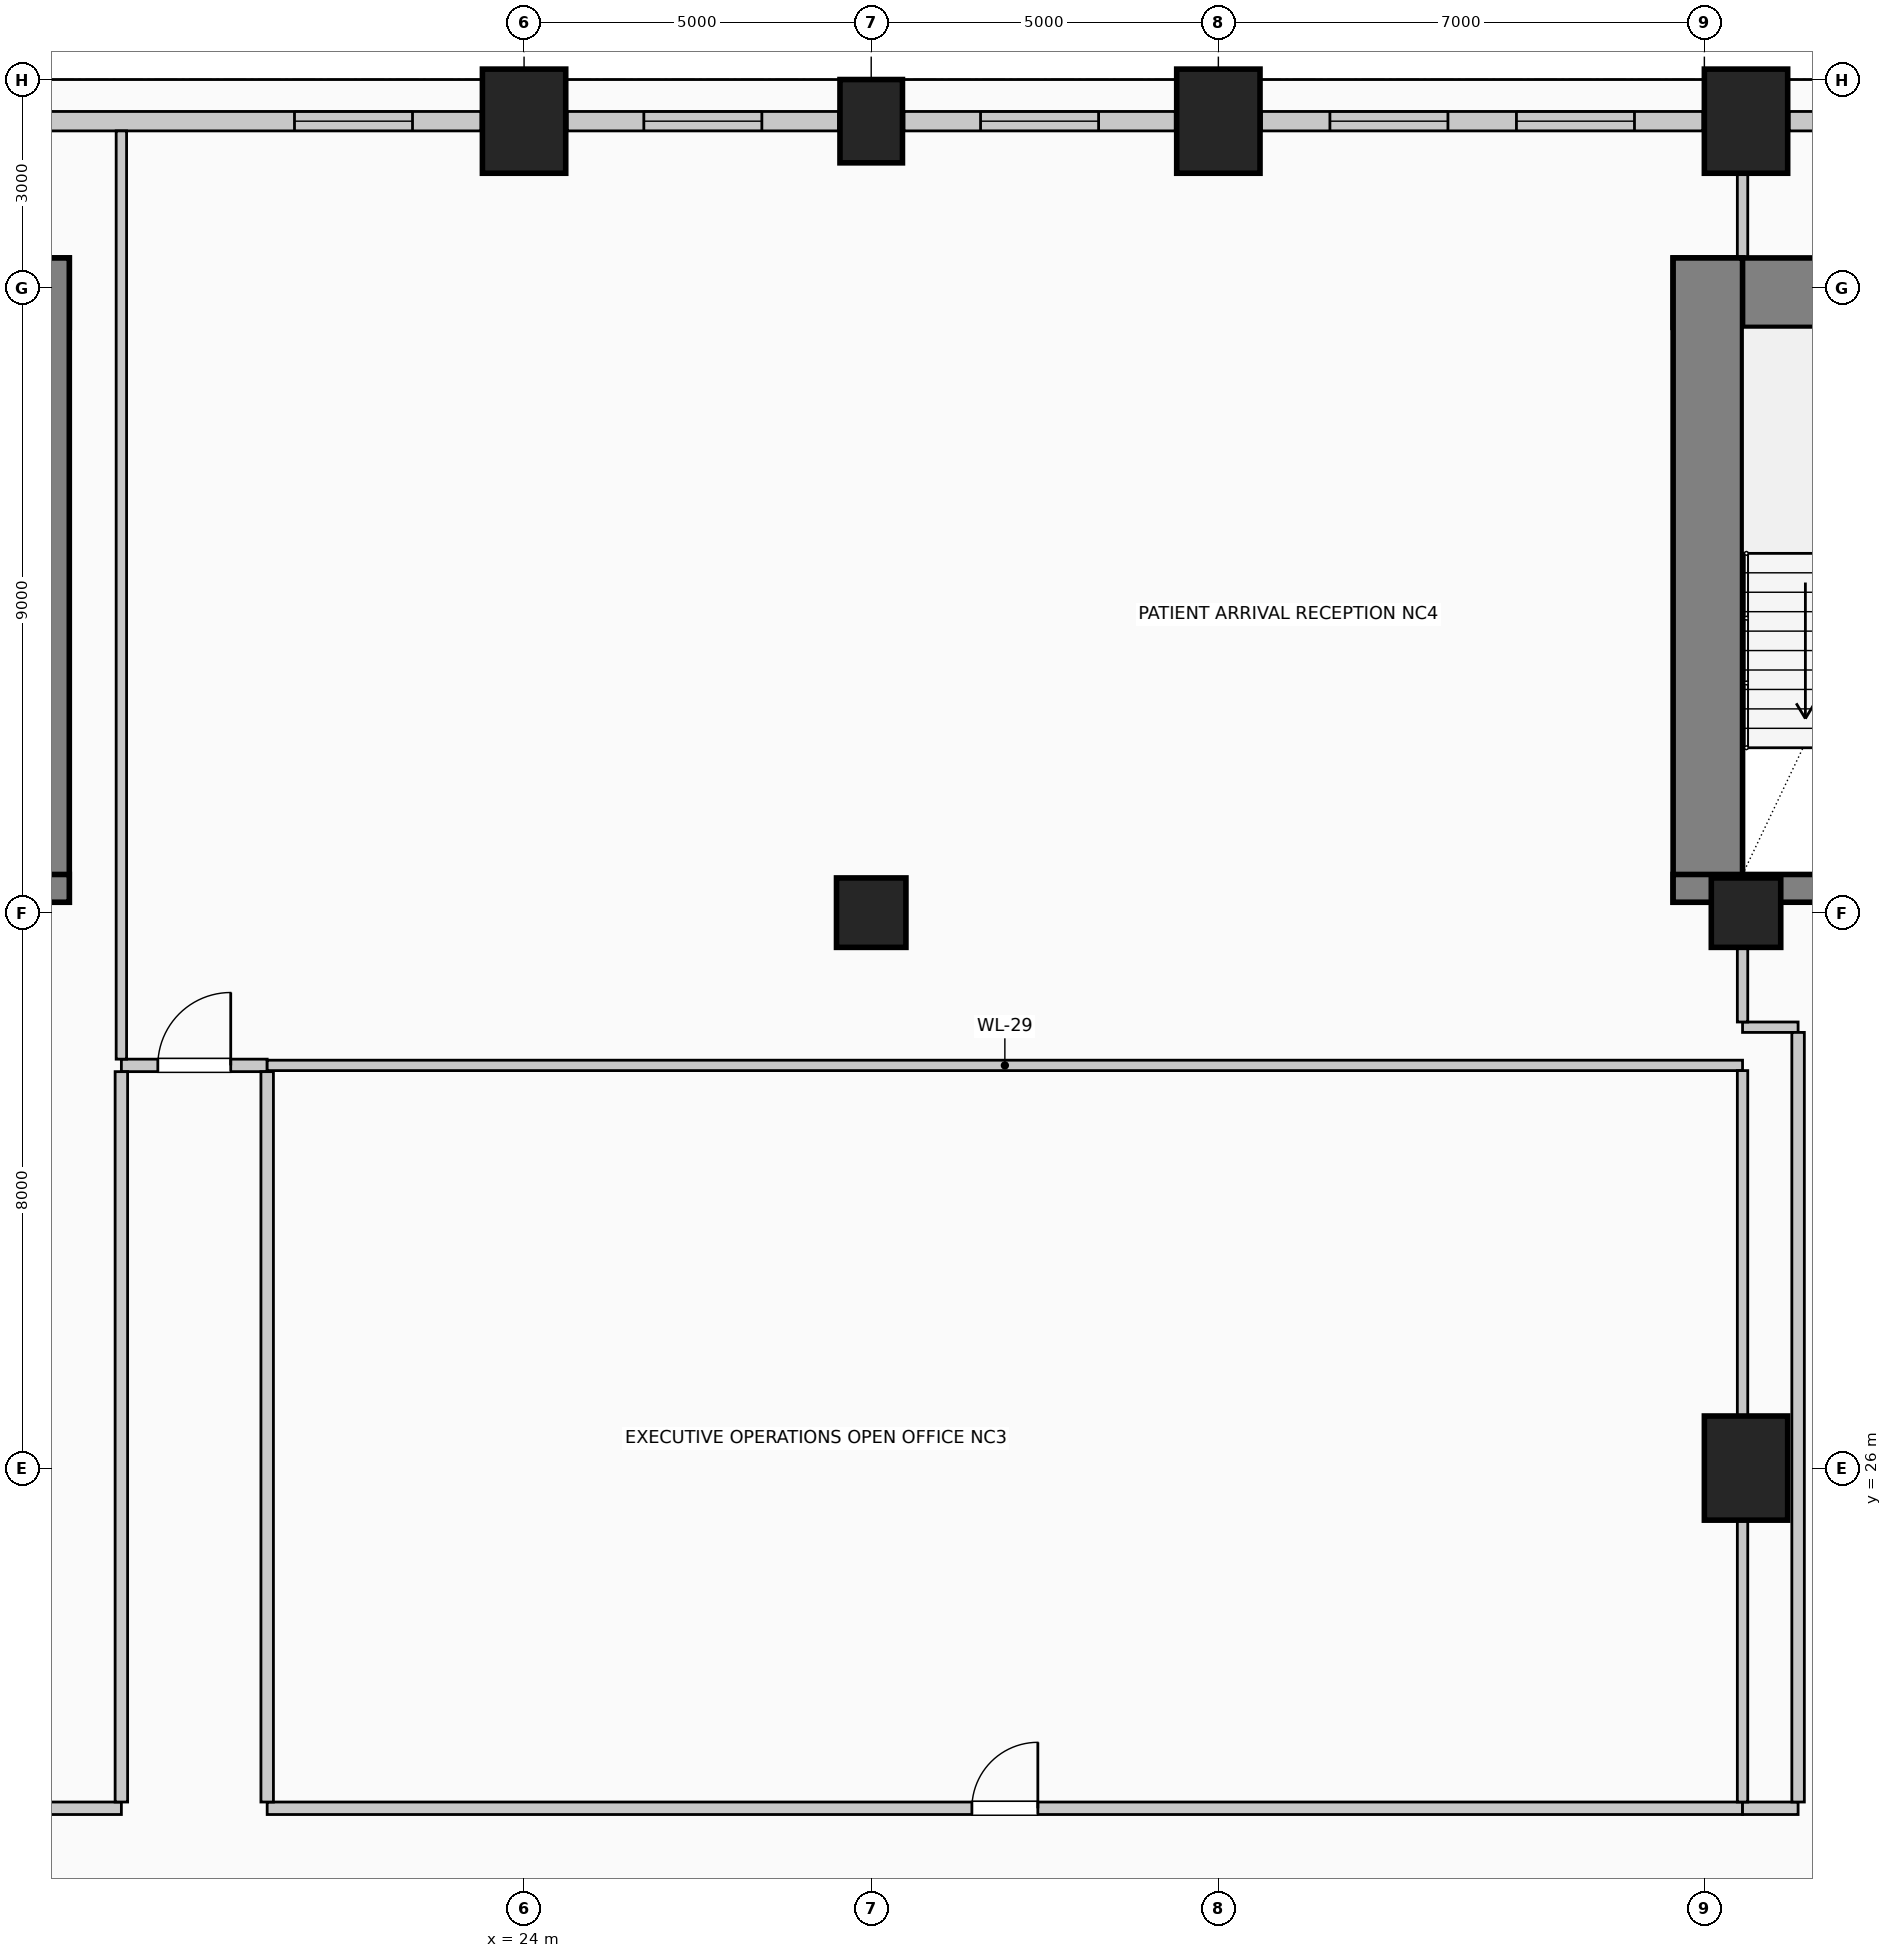
"""IFC4 building model, lengths in metres.
Left out: names, types, materials, properties, quantities, classifications, styles, units other than length and angle.
Written with IfcOpenShell. Run it as: python <this file> out.ifc"""

import sys

from ifc_helpers import new_model, si_unit, direction, frame, frame_2d, origin, origin_2d, place, context, subcontext, project, spatial, rectangle, circle, extrude, element, fill, save


model = new_model("IFC4")
c1 = context("Model", 3, precision=1e-05, world=origin(), true_north=direction((0.0, 1.0)))
c2 = subcontext(c1, "Body", "Model", "MODEL_VIEW")
j1 = project(units=[si_unit("LENGTHUNIT", "METRE"), si_unit("PLANEANGLEUNIT", "RADIAN")], contexts=[c1])
p1 = place(None, origin())
s1 = spatial("IfcSite", under=j1, at=p1, CompositionType="ELEMENT")
p2 = place(p1, origin())
s2 = spatial("IfcBuilding", under=s1, at=p2, CompositionType="ELEMENT")
p3 = place(p2, frame((0.0, 0.0, 54.6)))
s3 = spatial("IfcBuildingStorey", under=s2, at=p3, CompositionType="ELEMENT", Elevation=54.6)
p4 = place(p3, frame((2.55, 42.93, 0.0), z_axis=(0.0, 0.0, 1.0), x_axis=(1.0, 0.0, 0.0)))
e1 = element("IfcWall", 1, at=p4, inside=s3, PredefinedType="SHEAR", context=c2, shape_type="SweptSolid", body=[
    extrude(rectangle(XDim=14.9, YDim=1.0, at=frame_2d((7.45, 0.0))), origin(), (0.0, 0.0, 1.0), 4.0),
])
p5 = place(p3, frame((16.95, 34.15, 0.0), z_axis=(0.0, 0.0, 1.0), x_axis=(0.0, 1.0, 0.0)))
e2 = element("IfcWall", 2, at=p5, inside=s3, PredefinedType="SHEAR", context=c2, shape_type="SweptSolid", body=[
    extrude(rectangle(XDim=9.28, YDim=1.0, at=frame_2d((4.64, 0.0))), origin(), (0.0, 0.0, 1.0), 4.0),
])
p6 = place(p3, frame((12.29, 34.35, 0.0), z_axis=(0.0, 0.0, 1.0), x_axis=(1.0, 0.0, 0.0)))
e3 = element("IfcWall", 3, at=p6, inside=s3, PredefinedType="SHEAR", context=c2, shape_type="SweptSolid", body=[
    extrude(rectangle(XDim=5.16, YDim=0.4, at=frame_2d((2.58, 0.0))), origin(), (0.0, 0.0, 1.0), 4.0),
])
p7 = place(p6, frame((1.4, 0.0, 0.0)))
e4 = element("IfcOpeningElement", 4, at=p7, cuts=e3, PredefinedType="OPENING", context=c2, shape_type="SweptSolid", body=[
    extrude(rectangle(XDim=1.15, YDim=2.2, at=frame_2d((0.575, 1.1))), frame((0.0, 0.21, 0.0), z_axis=(0.0, -1.0, 0.0), x_axis=(1.0, 0.0, 0.0)), (0.0, 0.0, 1.0), 0.42),
])
p8 = place(p3, frame((40.55, 42.93, 0.0), z_axis=(0.0, 0.0, 1.0), x_axis=(1.0, 0.0, 0.0)))
e5 = element("IfcWall", 5, at=p8, inside=s3, PredefinedType="SHEAR", context=c2, shape_type="SweptSolid", body=[
    extrude(rectangle(XDim=14.9, YDim=1.0, at=frame_2d((7.45, 0.0))), origin(), (0.0, 0.0, 1.0), 4.0),
])
p9 = place(p3, frame((41.05, 34.15, 0.0), z_axis=(0.0, 0.0, 1.0), x_axis=(0.0, 1.0, 0.0)))
e6 = element("IfcWall", 6, at=p9, inside=s3, PredefinedType="SHEAR", context=c2, shape_type="SweptSolid", body=[
    extrude(rectangle(XDim=9.28, YDim=1.0, at=frame_2d((4.64, 0.0))), origin(), (0.0, 0.0, 1.0), 4.0),
])
p10 = place(p3, frame((40.55, 34.35, 0.0), z_axis=(0.0, 0.0, 1.0), x_axis=(1.0, 0.0, 0.0)))
e7 = element("IfcWall", 7, at=p10, inside=s3, PredefinedType="SHEAR", context=c2, shape_type="SweptSolid", body=[
    extrude(rectangle(XDim=5.16, YDim=0.4, at=frame_2d((2.58, 0.0))), origin(), (0.0, 0.0, 1.0), 4.0),
])
p11 = place(p10, frame((2.4, 0.0, 0.0)))
e8 = element("IfcOpeningElement", 8, at=p11, cuts=e7, PredefinedType="OPENING", context=c2, shape_type="SweptSolid", body=[
    extrude(rectangle(XDim=1.15, YDim=2.2, at=frame_2d((0.575, 1.1))), frame((0.0, 0.21, 0.0), z_axis=(0.0, -1.0, 0.0), x_axis=(1.0, 0.0, 0.0)), (0.0, 0.0, 1.0), 0.42),
])
p12 = place(p3, frame((24.0, 45.4, 0.0), z_axis=(0.0, 0.0, 1.0), x_axis=(1.0, 0.0, 0.0)))
e9 = element("IfcColumn", 9, at=p12, inside=s3, PredefinedType="COLUMN", context=c2, shape_type="SweptSolid", body=[
    extrude(rectangle(XDim=1.2, YDim=1.5, at=origin_2d()), origin(), (0.0, 0.0, 1.0), 4.0),
])
p13 = place(p3, frame((29.0, 45.4, 0.0), z_axis=(0.0, 0.0, 1.0), x_axis=(1.0, 0.0, 0.0)))
e10 = element("IfcColumn", 10, at=p13, inside=s3, PredefinedType="COLUMN", context=c2, shape_type="SweptSolid", body=[
    extrude(rectangle(XDim=0.9, YDim=1.2, at=origin_2d()), origin(), (0.0, 0.0, 1.0), 4.0),
])
for number, where, z_axis, x_axis in (
    (11, (34.0, 45.4, 0.0), (0.0, 0.0, 1.0), (1.0, 0.0, 0.0)),
    (12, (41.6, 45.4, 0.0), (0.0, 0.0, 1.0), (1.0, 0.0, 0.0)),
    (13, (41.6, 26.0, 0.0), (0.0, 0.0, 1.0), (1.0, 0.0, 0.0)),
):
    element("IfcColumn", number, at=place(p3, frame(where, z_axis=z_axis, x_axis=x_axis)), inside=s3, PredefinedType="COLUMN", context=c2, shape_type="SweptSolid", body=[
        extrude(rectangle(XDim=1.2, YDim=1.5, at=origin_2d()), origin(), (0.0, 0.0, 1.0), 4.0),
    ])
for number, where, z_axis, x_axis in (
    (14, (29.0, 34.0, 0.0), (0.0, 0.0, 1.0), (1.0, 0.0, 0.0)),
    (15, (41.6, 34.0, 0.0), (0.0, 0.0, 1.0), (1.0, 0.0, 0.0)),
):
    element("IfcColumn", number, at=place(p3, frame(where, z_axis=z_axis, x_axis=x_axis)), inside=s3, PredefinedType="COLUMN", context=c2, shape_type="SweptSolid", body=[
        extrude(circle(Radius=0.5, at=origin_2d()), origin(), (0.0, 0.0, 1.0), 4.0),
    ])
p14 = place(p3, frame((17.02, 45.4, 0.0), z_axis=(0.0, 0.0, 1.0), x_axis=(1.0, 0.0, 0.0)))
e16 = element("IfcWall", 16, at=p14, inside=s3, PredefinedType="SOLIDWALL", context=c2, shape_type="SweptSolid", body=[
    extrude(rectangle(XDim=6.36, YDim=0.28, at=frame_2d((3.18, 0.0))), origin(), (0.0, 0.0, 1.0), 2.85),
])
p15 = place(p14, frame((3.673, 0.0, 0.5)))
e17 = element("IfcOpeningElement", 17, at=p15, cuts=e16, PredefinedType="OPENING", context=c2, shape_type="SweptSolid", body=[
    extrude(rectangle(XDim=1.7, YDim=1.95, at=frame_2d((0.85, 0.975))), frame((0.0, 0.15, 0.0), z_axis=(0.0, -1.0, 0.0), x_axis=(1.0, 0.0, 0.0)), (0.0, 0.0, 1.0), 0.3),
])
p16 = place(p3, frame((24.62, 45.4, 0.0), z_axis=(0.0, 0.0, 1.0), x_axis=(1.0, 0.0, 0.0)))
e18 = element("IfcWall", 18, at=p16, inside=s3, PredefinedType="SOLIDWALL", context=c2, shape_type="SweptSolid", body=[
    extrude(rectangle(XDim=3.91, YDim=0.28, at=frame_2d((1.955, 0.0))), origin(), (0.0, 0.0, 1.0), 2.85),
])
p17 = place(p16, frame((1.105, 0.0, 0.5)))
e19 = element("IfcOpeningElement", 19, at=p17, cuts=e18, PredefinedType="OPENING", context=c2, shape_type="SweptSolid", body=[
    extrude(rectangle(XDim=1.7, YDim=1.95, at=frame_2d((0.85, 0.975))), frame((0.0, 0.15, 0.0), z_axis=(0.0, -1.0, 0.0), x_axis=(1.0, 0.0, 0.0)), (0.0, 0.0, 1.0), 0.3),
])
p18 = place(p3, frame((29.47, 45.4, 0.0), z_axis=(0.0, 0.0, 1.0), x_axis=(1.0, 0.0, 0.0)))
e20 = element("IfcWall", 20, at=p18, inside=s3, PredefinedType="SOLIDWALL", context=c2, shape_type="SweptSolid", body=[
    extrude(rectangle(XDim=3.91, YDim=0.28, at=frame_2d((1.955, 0.0))), origin(), (0.0, 0.0, 1.0), 2.85),
])
p19 = place(p18, frame((1.105, 0.0, 0.5)))
e21 = element("IfcOpeningElement", 21, at=p19, cuts=e20, PredefinedType="OPENING", context=c2, shape_type="SweptSolid", body=[
    extrude(rectangle(XDim=1.7, YDim=1.95, at=frame_2d((0.85, 0.975))), frame((0.0, 0.15, 0.0), z_axis=(0.0, -1.0, 0.0), x_axis=(1.0, 0.0, 0.0)), (0.0, 0.0, 1.0), 0.3),
])
p20 = place(p3, frame((34.62, 45.4, 0.0), z_axis=(0.0, 0.0, 1.0), x_axis=(1.0, 0.0, 0.0)))
e22 = element("IfcWall", 22, at=p20, inside=s3, PredefinedType="SOLIDWALL", context=c2, shape_type="SweptSolid", body=[
    extrude(rectangle(XDim=6.36, YDim=0.28, at=frame_2d((3.18, 0.0))), origin(), (0.0, 0.0, 1.0), 2.85),
])
p21 = place(p20, frame((0.987, 0.0, 0.5)))
e23 = element("IfcOpeningElement", 23, at=p21, cuts=e22, PredefinedType="OPENING", context=c2, shape_type="SweptSolid", body=[
    extrude(rectangle(XDim=1.7, YDim=1.95, at=frame_2d((0.85, 0.975))), frame((0.0, 0.15, 0.0), z_axis=(0.0, -1.0, 0.0), x_axis=(1.0, 0.0, 0.0)), (0.0, 0.0, 1.0), 0.3),
])
p22 = place(p20, frame((3.673, 0.0, 0.5)))
e24 = element("IfcOpeningElement", 24, at=p22, cuts=e22, PredefinedType="OPENING", context=c2, shape_type="SweptSolid", body=[
    extrude(rectangle(XDim=1.7, YDim=1.95, at=frame_2d((0.85, 0.975))), frame((0.0, 0.15, 0.0), z_axis=(0.0, -1.0, 0.0), x_axis=(1.0, 0.0, 0.0)), (0.0, 0.0, 1.0), 0.3),
])
p23 = place(p3, frame((42.22, 45.4, 0.0), z_axis=(0.0, 0.0, 1.0), x_axis=(1.0, 0.0, 0.0)))
e25 = element("IfcWall", 25, at=p23, inside=s3, PredefinedType="SOLIDWALL", context=c2, shape_type="SweptSolid", body=[
    extrude(rectangle(XDim=1.31, YDim=0.28, at=frame_2d((0.655, 0.0))), origin(), (0.0, 0.0, 1.0), 2.85),
])
p24 = place(p3, frame((12.2, 21.1, 0.0), z_axis=(0.0, 0.0, 1.0), x_axis=(1.0, 0.0, 0.0)))
e26 = element("IfcWall", 26, at=p24, inside=s3, PredefinedType="PARTITIONING", context=c2, shape_type="SweptSolid", body=[
    extrude(rectangle(XDim=6.0, YDim=0.18, at=frame_2d((3.0, 0.0))), origin(), (0.0, 0.0, 1.0), 3.7),
])
p25 = place(p3, frame((20.3, 21.1, 0.0), z_axis=(0.0, 0.0, 1.0), x_axis=(1.0, 0.0, 0.0)))
e27 = element("IfcWall", 27, at=p25, inside=s3, PredefinedType="PARTITIONING", context=c2, shape_type="SweptSolid", body=[
    extrude(rectangle(XDim=21.25, YDim=0.18, at=frame_2d((10.625, 0.0))), origin(), (0.0, 0.0, 1.0), 3.7),
])
p26 = place(p25, frame((10.15, 0.0, 0.0)))
e28 = element("IfcOpeningElement", 28, at=p26, cuts=e27, PredefinedType="OPENING", context=c2, shape_type="SweptSolid", body=[
    extrude(rectangle(XDim=0.95, YDim=2.15, at=frame_2d((0.475, 1.075))), frame((0.0, 0.1, 0.0), z_axis=(0.0, -1.0, 0.0), x_axis=(1.0, 0.0, 0.0)), (0.0, 0.0, 1.0), 0.2),
])
p27 = place(p3, frame((41.55, 21.1, 0.0), z_axis=(0.0, 0.0, 1.0), x_axis=(1.0, 0.0, 0.0)))
e29 = element("IfcWall", 29, at=p27, inside=s3, PredefinedType="PARTITIONING", context=c2, shape_type="SweptSolid", body=[
    extrude(rectangle(XDim=0.8, YDim=0.18, at=frame_2d((0.4, 0.0))), origin(), (0.0, 0.0, 1.0), 3.7),
])
p28 = place(p3, frame((18.2, 31.8, 0.0), z_axis=(0.0, 0.0, 1.0), x_axis=(1.0, 0.0, 0.0)))
e30 = element("IfcWall", 30, at=p28, inside=s3, PredefinedType="PARTITIONING", context=c2, shape_type="SweptSolid", body=[
    extrude(rectangle(XDim=2.1, YDim=0.18, at=frame_2d((1.05, 0.0))), origin(), (0.0, 0.0, 1.0), 3.7),
])
p29 = place(p28, frame((0.525, 0.0, 0.0)))
e31 = element("IfcOpeningElement", 31, at=p29, cuts=e30, PredefinedType="OPENING", context=c2, shape_type="SweptSolid", body=[
    extrude(rectangle(XDim=1.05, YDim=2.15, at=frame_2d((0.525, 1.075))), frame((0.0, 0.1, 0.0), z_axis=(0.0, -1.0, 0.0), x_axis=(1.0, 0.0, 0.0)), (0.0, 0.0, 1.0), 0.2),
])
p30 = place(p3, frame((20.3, 31.8, 0.0), z_axis=(0.0, 0.0, 1.0), x_axis=(1.0, 0.0, 0.0)))
e32 = element("IfcWall", 32, at=p30, inside=s3, PredefinedType="PARTITIONING", context=c2, shape_type="SweptSolid", body=[
    extrude(rectangle(XDim=21.25, YDim=0.15, at=frame_2d((10.625, 0.0))), origin(), (0.0, 0.0, 1.0), 3.7),
])
p31 = place(p3, frame((41.55, 32.35, 0.0), z_axis=(0.0, 0.0, 1.0), x_axis=(1.0, 0.0, 0.0)))
e33 = element("IfcWall", 33, at=p31, inside=s3, PredefinedType="PARTITIONING", context=c2, shape_type="SweptSolid", body=[
    extrude(rectangle(XDim=0.8, YDim=0.15, at=frame_2d((0.4, 0.0))), origin(), (0.0, 0.0, 1.0), 3.7),
])
p32 = place(p3, frame((18.2, 21.19, 0.0), z_axis=(0.0, 0.0, 1.0), x_axis=(0.0, 1.0, 0.0)))
e34 = element("IfcWall", 34, at=p32, inside=s3, PredefinedType="PARTITIONING", context=c2, shape_type="SweptSolid", body=[
    extrude(rectangle(XDim=10.52, YDim=0.18, at=frame_2d((5.26, 0.0))), origin(), (0.0, 0.0, 1.0), 3.7),
])
p33 = place(p3, frame((18.2, 31.89, 0.0), z_axis=(0.0, 0.0, 1.0), x_axis=(0.0, 1.0, 0.0)))
e35 = element("IfcWall", 35, at=p33, inside=s3, PredefinedType="PARTITIONING", context=c2, shape_type="SweptSolid", body=[
    extrude(rectangle(XDim=13.37, YDim=0.15, at=frame_2d((6.685, 0.0))), origin(), (0.0, 0.0, 1.0), 3.7),
])
p34 = place(p3, frame((20.3, 21.19, 0.0), z_axis=(0.0, 0.0, 1.0), x_axis=(0.0, 1.0, 0.0)))
e36 = element("IfcWall", 36, at=p34, inside=s3, PredefinedType="PARTITIONING", context=c2, shape_type="SweptSolid", body=[
    extrude(rectangle(XDim=10.52, YDim=0.18, at=frame_2d((5.26, 0.0))), origin(), (0.0, 0.0, 1.0), 3.7),
])
p35 = place(p3, frame((41.55, 21.19, 0.0), z_axis=(0.0, 0.0, 1.0), x_axis=(0.0, 1.0, 0.0)))
e37 = element("IfcWall", 37, at=p35, inside=s3, PredefinedType="PARTITIONING", context=c2, shape_type="SweptSolid", body=[
    extrude(rectangle(XDim=4.06, YDim=0.15, at=frame_2d((2.03, 0.0))), origin(), (0.0, 0.0, 1.0), 2.995),
])
p36 = place(p3, frame((41.55, 26.75, 0.0), z_axis=(0.0, 0.0, 1.0), x_axis=(0.0, 1.0, 0.0)))
e38 = element("IfcWall", 38, at=p36, inside=s3, PredefinedType="PARTITIONING", context=c2, shape_type="SweptSolid", body=[
    extrude(rectangle(XDim=4.975, YDim=0.15, at=frame_2d((2.488, 0.0))), origin(), (0.0, 0.0, 1.0), 2.995),
])
p37 = place(p3, frame((41.55, 32.425, 0.0), z_axis=(0.0, 0.0, 1.0), x_axis=(0.0, 1.0, 0.0)))
e39 = element("IfcWall", 39, at=p37, inside=s3, PredefinedType="PARTITIONING", context=c2, shape_type="SweptSolid", body=[
    extrude(rectangle(XDim=1.075, YDim=0.15, at=frame_2d((0.538, 0.0))), origin(), (0.0, 0.0, 1.0), 2.995),
])
p38 = place(p3, frame((41.55, 43.43, 0.0), z_axis=(0.0, 0.0, 1.0), x_axis=(0.0, 1.0, 0.0)))
e40 = element("IfcWall", 40, at=p38, inside=s3, PredefinedType="PARTITIONING", context=c2, shape_type="SweptSolid", body=[
    extrude(rectangle(XDim=1.22, YDim=0.15, at=frame_2d((0.61, 0.0))), origin(), (0.0, 0.0, 1.0), 3.7),
])
p39 = place(p3, frame((42.35, 21.19, 0.0), z_axis=(0.0, 0.0, 1.0), x_axis=(0.0, 1.0, 0.0)))
e41 = element("IfcWall", 41, at=p39, inside=s3, PredefinedType="PARTITIONING", context=c2, shape_type="SweptSolid", body=[
    extrude(rectangle(XDim=11.085, YDim=0.18, at=frame_2d((5.542, 0.0))), origin(), (0.0, 0.0, 1.0), 3.7),
])
p40 = place(p15, origin())
e42 = element("IfcWindow", 42, at=p40, inside=s3, PartitioningType="SINGLE_PANEL", PredefinedType="WINDOW", context=c2, shape_type="SweptSolid", body=[
    extrude(rectangle(XDim=1.7, YDim=1.95, at=frame_2d((0.85, 0.975))), frame((0.0, 0.03, 0.0), z_axis=(0.0, -1.0, 0.0), x_axis=(1.0, 0.0, 0.0)), (0.0, 0.0, 1.0), 0.06),
])
fill(e17, e42)
p41 = place(p17, origin())
e43 = element("IfcWindow", 43, at=p41, inside=s3, PartitioningType="SINGLE_PANEL", PredefinedType="WINDOW", context=c2, shape_type="SweptSolid", body=[
    extrude(rectangle(XDim=1.7, YDim=1.95, at=frame_2d((0.85, 0.975))), frame((0.0, 0.03, 0.0), z_axis=(0.0, -1.0, 0.0), x_axis=(1.0, 0.0, 0.0)), (0.0, 0.0, 1.0), 0.06),
])
fill(e19, e43)
p42 = place(p19, origin())
e44 = element("IfcWindow", 44, at=p42, inside=s3, PartitioningType="SINGLE_PANEL", PredefinedType="WINDOW", context=c2, shape_type="SweptSolid", body=[
    extrude(rectangle(XDim=1.7, YDim=1.95, at=frame_2d((0.85, 0.975))), frame((0.0, 0.03, 0.0), z_axis=(0.0, -1.0, 0.0), x_axis=(1.0, 0.0, 0.0)), (0.0, 0.0, 1.0), 0.06),
])
fill(e21, e44)
p43 = place(p21, origin())
e45 = element("IfcWindow", 45, at=p43, inside=s3, PartitioningType="SINGLE_PANEL", PredefinedType="WINDOW", context=c2, shape_type="SweptSolid", body=[
    extrude(rectangle(XDim=1.7, YDim=1.95, at=frame_2d((0.85, 0.975))), frame((0.0, 0.03, 0.0), z_axis=(0.0, -1.0, 0.0), x_axis=(1.0, 0.0, 0.0)), (0.0, 0.0, 1.0), 0.06),
])
fill(e23, e45)
p44 = place(p22, origin())
e46 = element("IfcWindow", 46, at=p44, inside=s3, PartitioningType="SINGLE_PANEL", PredefinedType="WINDOW", context=c2, shape_type="SweptSolid", body=[
    extrude(rectangle(XDim=1.7, YDim=1.95, at=frame_2d((0.85, 0.975))), frame((0.0, 0.03, 0.0), z_axis=(0.0, -1.0, 0.0), x_axis=(1.0, 0.0, 0.0)), (0.0, 0.0, 1.0), 0.06),
])
fill(e24, e46)
p45 = place(p26, origin())
e47 = element("IfcDoor", 47, at=p45, inside=s3, OperationType="SINGLE_SWING_RIGHT", PredefinedType="DOOR", context=c2, shape_type="SweptSolid", body=[
    extrude(rectangle(XDim=0.95, YDim=2.15, at=frame_2d((0.475, 1.075))), frame((0.0, 0.025, 0.0), z_axis=(0.0, -1.0, 0.0), x_axis=(1.0, 0.0, 0.0)), (0.0, 0.0, 1.0), 0.05),
])
fill(e28, e47)
p46 = place(p29, origin())
e48 = element("IfcDoor", 48, at=p46, inside=s3, OperationType="SINGLE_SWING_RIGHT", PredefinedType="DOOR", context=c2, shape_type="SweptSolid", body=[
    extrude(rectangle(XDim=1.05, YDim=2.15, at=frame_2d((0.525, 1.075))), frame((0.0, 0.025, 0.0), z_axis=(0.0, -1.0, 0.0), x_axis=(1.0, 0.0, 0.0)), (0.0, 0.0, 1.0), 0.05),
])
fill(e31, e48)
save(model, sys.argv[1])
